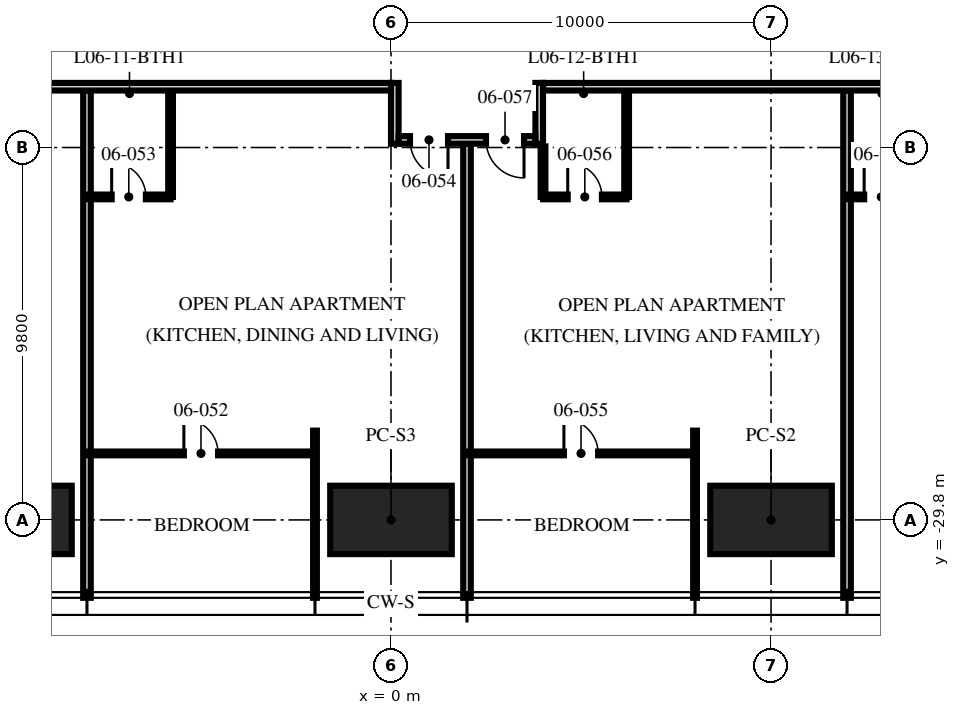
"""IFC4 building model, lengths in metres.
Left out: names, types, materials, properties, quantities, classifications, styles, units other than length and angle.
Written with IfcOpenShell. Run it as: python <this file> out.ifc"""

import sys

from ifc_helpers import new_model, si_unit, direction, frame, frame_2d, origin, origin_2d, place, context, subcontext, project, spatial, rectangle, hollow_rectangle, extrude, element, fill, save


model = new_model("IFC4")
c1 = context("Model", 3, precision=1e-05, world=origin(), true_north=direction((0.0, 1.0)))
c2 = subcontext(c1, "Body", "Model", "MODEL_VIEW")
j1 = project(units=[si_unit("LENGTHUNIT", "METRE"), si_unit("PLANEANGLEUNIT", "RADIAN")], contexts=[c1])
p1 = place(None, origin())
s1 = spatial("IfcSite", under=j1, at=p1, CompositionType="ELEMENT")
p2 = place(p1, origin())
s2 = spatial("IfcBuilding", under=s1, at=p2, CompositionType="ELEMENT")
p3 = place(p2, frame((0.0, 0.0, 28.5)))
s3 = spatial("IfcBuildingStorey", under=s2, at=p3, CompositionType="ELEMENT", Elevation=28.5)
for number, where, z_axis, x_axis in (
    (1, (10.0, -29.8, 0.0), (0.0, 0.0, 1.0), (1.0, 0.0, 0.0)),
    (2, (0.0, -29.8, 0.0), (0.0, 0.0, 1.0), (1.0, 0.0, 0.0)),
    (3, (-10.0, -29.8, 0.0), (0.0, 0.0, 1.0), (1.0, 0.0, 0.0)),
):
    element("IfcColumn", number, at=place(p3, frame(where, z_axis=z_axis, x_axis=x_axis)), inside=s3, PredefinedType="COLUMN", context=c2, shape_type="SweptSolid", body=[
        extrude(hollow_rectangle(XDim=3.2, YDim=1.8, WallThickness=0.2, at=origin_2d()), origin(), (0.0, 0.0, 1.0), 3.75),
    ])
p4 = place(p3, frame((-8.0, -18.5, 0.0), z_axis=(0.0, 0.0, 1.0), x_axis=(0.0, -1.0, 0.0)))
e4 = element("IfcWall", 4, at=p4, inside=s3, PredefinedType="PARTITIONING", context=c2, shape_type="SweptSolid", body=[
    extrude(rectangle(XDim=13.35, YDim=0.2, at=frame_2d((6.675, 0.0))), origin(), (0.0, 0.0, 1.0), 2.71),
])
p5 = place(p3, frame((-2.0, -27.45, 0.0), z_axis=(0.0, 0.0, 1.0), x_axis=(0.0, -1.0, 0.0)))
e5 = element("IfcWall", 5, at=p5, inside=s3, PredefinedType="PARTITIONING", context=c2, shape_type="SweptSolid", body=[
    extrude(rectangle(XDim=4.4, YDim=0.1, at=frame_2d((2.2, 0.0))), origin(), (0.0, 0.0, 1.0), 2.71),
])
p6 = place(p3, frame((2.0, -19.9, 0.0), z_axis=(0.0, 0.0, 1.0), x_axis=(0.0, -1.0, 0.0)))
e6 = element("IfcWall", 6, at=p6, inside=s3, PredefinedType="PARTITIONING", context=c2, shape_type="SweptSolid", body=[
    extrude(rectangle(XDim=11.95, YDim=0.2, at=frame_2d((5.975, 0.0))), origin(), (0.0, 0.0, 1.0), 2.71),
])
p7 = place(p3, frame((8.0, -27.45, 0.0), z_axis=(0.0, 0.0, 1.0), x_axis=(0.0, -1.0, 0.0)))
e7 = element("IfcWall", 7, at=p7, inside=s3, PredefinedType="PARTITIONING", context=c2, shape_type="SweptSolid", body=[
    extrude(rectangle(XDim=4.4, YDim=0.1, at=frame_2d((2.2, 0.0))), origin(), (0.0, 0.0, 1.0), 2.71),
])
p8 = place(p3, frame((12.0, -18.5, 0.0), z_axis=(0.0, 0.0, 1.0), x_axis=(0.0, -1.0, 0.0)))
e8 = element("IfcWall", 8, at=p8, inside=s3, PredefinedType="PARTITIONING", context=c2, shape_type="SweptSolid", body=[
    extrude(rectangle(XDim=13.35, YDim=0.2, at=frame_2d((6.675, 0.0))), origin(), (0.0, 0.0, 1.0), 2.71),
])
p9 = place(p3, frame((-8.0, -28.05, 0.0), z_axis=(0.0, 0.0, 1.0), x_axis=(1.0, 0.0, 0.0)))
e9 = element("IfcWall", 9, at=p9, inside=s3, PredefinedType="PARTITIONING", context=c2, shape_type="SweptSolid", body=[
    extrude(rectangle(XDim=6.0, YDim=0.1, at=frame_2d((3.0, 0.0))), origin(), (0.0, 0.0, 1.0), 2.61),
])
p10 = place(p9, frame((2.55, 0.0, 0.0)))
e10 = element("IfcOpeningElement", 10, at=p10, cuts=e9, PredefinedType="OPENING", context=c2, shape_type="SweptSolid", body=[
    extrude(rectangle(XDim=0.9, YDim=2.1, at=frame_2d((0.45, 1.05))), frame((0.0, 0.06, 0.0), z_axis=(0.0, -1.0, 0.0), x_axis=(1.0, 0.0, 0.0)), (0.0, 0.0, 1.0), 0.12),
])
p11 = place(p3, frame((-8.0, -21.3, 0.0), z_axis=(0.0, 0.0, 1.0), x_axis=(1.0, 0.0, 0.0)))
e11 = element("IfcWall", 11, at=p11, inside=s3, PredefinedType="PARTITIONING", context=c2, shape_type="SweptSolid", body=[
    extrude(rectangle(XDim=2.2, YDim=0.125, at=frame_2d((1.1, 0.0))), origin(), (0.0, 0.0, 1.0), 3.5),
])
p12 = place(p11, frame((0.65, 0.0, 0.0)))
e12 = element("IfcOpeningElement", 12, at=p12, cuts=e11, PredefinedType="OPENING", context=c2, shape_type="SweptSolid", body=[
    extrude(rectangle(XDim=0.9, YDim=2.1, at=frame_2d((0.45, 1.05))), frame((0.0, 0.073, 0.0), z_axis=(0.0, -1.0, 0.0), x_axis=(1.0, 0.0, 0.0)), (0.0, 0.0, 1.0), 0.145),
])
p13 = place(p3, frame((-5.8, -18.5, 0.0), z_axis=(0.0, 0.0, 1.0), x_axis=(0.0, -1.0, 0.0)))
e13 = element("IfcWall", 13, at=p13, inside=s3, PredefinedType="PARTITIONING", context=c2, shape_type="SweptSolid", body=[
    extrude(rectangle(XDim=2.8, YDim=0.125, at=frame_2d((1.4, 0.0))), origin(), (0.0, 0.0, 1.0), 3.5),
])
p14 = place(p3, frame((2.0, -28.05, 0.0), z_axis=(0.0, 0.0, 1.0), x_axis=(1.0, 0.0, 0.0)))
e14 = element("IfcWall", 14, at=p14, inside=s3, PredefinedType="PARTITIONING", context=c2, shape_type="SweptSolid", body=[
    extrude(rectangle(XDim=6.0, YDim=0.1, at=frame_2d((3.0, 0.0))), origin(), (0.0, 0.0, 1.0), 2.61),
])
p15 = place(p14, frame((2.55, 0.0, 0.0)))
e15 = element("IfcOpeningElement", 15, at=p15, cuts=e14, PredefinedType="OPENING", context=c2, shape_type="SweptSolid", body=[
    extrude(rectangle(XDim=0.9, YDim=2.1, at=frame_2d((0.45, 1.05))), frame((0.0, 0.06, 0.0), z_axis=(0.0, -1.0, 0.0), x_axis=(1.0, 0.0, 0.0)), (0.0, 0.0, 1.0), 0.12),
])
p16 = place(p3, frame((4.0, -21.3, 0.0), z_axis=(0.0, 0.0, 1.0), x_axis=(1.0, 0.0, 0.0)))
e16 = element("IfcWall", 16, at=p16, inside=s3, PredefinedType="PARTITIONING", context=c2, shape_type="SweptSolid", body=[
    extrude(rectangle(XDim=2.2, YDim=0.125, at=frame_2d((1.1, 0.0))), origin(), (0.0, 0.0, 1.0), 2.61),
])
p17 = place(p16, frame((0.65, 0.0, 0.0)))
e17 = element("IfcOpeningElement", 17, at=p17, cuts=e16, PredefinedType="OPENING", context=c2, shape_type="SweptSolid", body=[
    extrude(rectangle(XDim=0.9, YDim=2.1, at=frame_2d((0.45, 1.05))), frame((0.0, 0.073, 0.0), z_axis=(0.0, -1.0, 0.0), x_axis=(1.0, 0.0, 0.0)), (0.0, 0.0, 1.0), 0.145),
])
p18 = place(p3, frame((4.0, -19.97, 0.0), z_axis=(0.0, 0.0, 1.0), x_axis=(0.0, -1.0, 0.0)))
e18 = element("IfcWall", 18, at=p18, inside=s3, PredefinedType="PARTITIONING", context=c2, shape_type="SweptSolid", body=[
    extrude(rectangle(XDim=1.33, YDim=0.125, at=frame_2d((0.665, 0.0))), origin(), (0.0, 0.0, 1.0), 3.5),
])
p19 = place(p3, frame((6.2, -18.5, 0.0), z_axis=(0.0, 0.0, 1.0), x_axis=(0.0, -1.0, 0.0)))
e19 = element("IfcWall", 19, at=p19, inside=s3, PredefinedType="PARTITIONING", context=c2, shape_type="SweptSolid", body=[
    extrude(rectangle(XDim=2.8, YDim=0.125, at=frame_2d((1.4, 0.0))), origin(), (0.0, 0.0, 1.0), 3.5),
])
p20 = place(p3, frame((12.0, -21.3, 0.0), z_axis=(0.0, 0.0, 1.0), x_axis=(1.0, 0.0, 0.0)))
e20 = element("IfcWall", 20, at=p20, inside=s3, PredefinedType="PARTITIONING", context=c2, shape_type="SweptSolid", body=[
    extrude(rectangle(XDim=1.8, YDim=0.125, at=frame_2d((0.9, 0.0))), origin(), (0.0, 0.0, 1.0), 3.5),
])
p21 = place(p20, frame((0.45, 0.0, 0.0)))
e21 = element("IfcOpeningElement", 21, at=p21, cuts=e20, PredefinedType="OPENING", context=c2, shape_type="SweptSolid", body=[
    extrude(rectangle(XDim=0.9, YDim=2.1, at=frame_2d((0.45, 1.05))), frame((0.0, 0.073, 0.0), z_axis=(0.0, -1.0, 0.0), x_axis=(1.0, 0.0, 0.0)), (0.0, 0.0, 1.0), 0.145),
])
p22 = place(p3, frame((18.5, -18.4, 0.0), z_axis=(0.0, 0.0, 1.0), x_axis=(-1.0, 0.0, 0.0)))
e22 = element("IfcWall", 22, at=p22, inside=s3, PredefinedType="PARTITIONING", context=c2, shape_type="SweptSolid", body=[
    extrude(rectangle(XDim=14.5, YDim=0.2, at=frame_2d((7.25, 0.0))), origin(), (0.0, 0.0, 1.0), 2.3),
])
p23 = place(p22, frame((0.93, 0.0, 0.0)))
e23 = element("IfcOpeningElement", 23, at=p23, cuts=e22, PredefinedType="OPENING", context=c2, shape_type="SweptSolid", body=[
    extrude(rectangle(XDim=1.0, YDim=2.2, at=frame_2d((0.5, 1.1))), frame((0.0, 0.11, 0.0), z_axis=(0.0, -1.0, 0.0), x_axis=(1.0, 0.0, 0.0)), (0.0, 0.0, 1.0), 0.22),
])
p24 = place(p3, frame((3.9, -18.3, 0.0), z_axis=(0.0, 0.0, 1.0), x_axis=(0.0, -1.0, 0.0)))
e24 = element("IfcWall", 24, at=p24, inside=s3, PredefinedType="PARTITIONING", context=c2, shape_type="SweptSolid", body=[
    extrude(rectangle(XDim=1.6, YDim=0.2, at=frame_2d((0.8, 0.0))), origin(), (0.0, 0.0, 1.0), 3.5),
])
p25 = place(p3, frame((0.1, -18.3, 0.0), z_axis=(0.0, 0.0, 1.0), x_axis=(0.0, -1.0, 0.0)))
e25 = element("IfcWall", 25, at=p25, inside=s3, PredefinedType="PARTITIONING", context=c2, shape_type="SweptSolid", body=[
    extrude(rectangle(XDim=1.6, YDim=0.2, at=frame_2d((0.8, 0.0))), origin(), (0.0, 0.0, 1.0), 2.492),
])
p26 = place(p3, frame((3.8, -19.8, 0.0), z_axis=(0.0, 0.0, 1.0), x_axis=(-1.0, 0.0, 0.0)))
e26 = element("IfcWall", 26, at=p26, inside=s3, PredefinedType="PARTITIONING", context=c2, shape_type="SweptSolid", body=[
    extrude(rectangle(XDim=3.6, YDim=0.2, at=frame_2d((1.8, 0.0))), origin(), (0.0, 0.0, 1.0), 3.5),
])
p27 = place(p26, frame((2.3, 0.0, 0.0)))
e27 = element("IfcOpeningElement", 27, at=p27, cuts=e26, PredefinedType="OPENING", context=c2, shape_type="SweptSolid", body=[
    extrude(rectangle(XDim=1.0, YDim=2.2, at=frame_2d((0.5, 1.1))), frame((0.0, 0.11, 0.0), z_axis=(0.0, -1.0, 0.0), x_axis=(1.0, 0.0, 0.0)), (0.0, 0.0, 1.0), 0.22),
])
p28 = place(p26, frame((0.3, 0.0, 0.0)))
e28 = element("IfcOpeningElement", 28, at=p28, cuts=e26, PredefinedType="OPENING", context=c2, shape_type="SweptSolid", body=[
    extrude(rectangle(XDim=1.0, YDim=2.2, at=frame_2d((0.5, 1.1))), frame((0.0, 0.11, 0.0), z_axis=(0.0, -1.0, 0.0), x_axis=(1.0, 0.0, 0.0)), (0.0, 0.0, 1.0), 0.22),
])
p29 = place(p3, frame((0.0, -18.4, 0.0), z_axis=(0.0, 0.0, 1.0), x_axis=(-1.0, 0.0, 0.0)))
e29 = element("IfcWall", 29, at=p29, inside=s3, PredefinedType="PARTITIONING", context=c2, shape_type="SweptSolid", body=[
    extrude(rectangle(XDim=18.5, YDim=0.2, at=frame_2d((9.25, 0.0))), origin(), (0.0, 0.0, 1.0), 2.3),
])
p30 = place(p10, origin())
e30 = element("IfcDoor", 30, at=p30, inside=s3, OperationType="SINGLE_SWING_LEFT", PredefinedType="DOOR", context=c2, shape_type="SweptSolid", body=[
    extrude(rectangle(XDim=0.9, YDim=2.1, at=frame_2d((0.45, 1.05))), frame((0.0, 0.025, 0.0), z_axis=(0.0, -1.0, 0.0), x_axis=(1.0, 0.0, 0.0)), (0.0, 0.0, 1.0), 0.05),
])
fill(e10, e30)
p31 = place(p12, origin())
e31 = element("IfcDoor", 31, at=p31, inside=s3, OperationType="SINGLE_SWING_LEFT", PredefinedType="DOOR", context=c2, shape_type="SweptSolid", body=[
    extrude(rectangle(XDim=0.9, YDim=2.1, at=frame_2d((0.45, 1.05))), frame((0.0, 0.025, 0.0), z_axis=(0.0, -1.0, 0.0), x_axis=(1.0, 0.0, 0.0)), (0.0, 0.0, 1.0), 0.05),
])
fill(e12, e31)
p32 = place(p27, origin())
e32 = element("IfcDoor", 32, at=p32, inside=s3, OperationType="SINGLE_SWING_LEFT", PredefinedType="DOOR", context=c2, shape_type="SweptSolid", body=[
    extrude(rectangle(XDim=1.0, YDim=2.2, at=frame_2d((0.5, 1.1))), frame((0.0, 0.025, 0.0), z_axis=(0.0, -1.0, 0.0), x_axis=(1.0, 0.0, 0.0)), (0.0, 0.0, 1.0), 0.05),
])
fill(e27, e32)
p33 = place(p15, origin())
e33 = element("IfcDoor", 33, at=p33, inside=s3, OperationType="SINGLE_SWING_LEFT", PredefinedType="DOOR", context=c2, shape_type="SweptSolid", body=[
    extrude(rectangle(XDim=0.9, YDim=2.1, at=frame_2d((0.45, 1.05))), frame((0.0, 0.025, 0.0), z_axis=(0.0, -1.0, 0.0), x_axis=(1.0, 0.0, 0.0)), (0.0, 0.0, 1.0), 0.05),
])
fill(e15, e33)
p34 = place(p17, origin())
e34 = element("IfcDoor", 34, at=p34, inside=s3, OperationType="SINGLE_SWING_LEFT", PredefinedType="DOOR", context=c2, shape_type="SweptSolid", body=[
    extrude(rectangle(XDim=0.9, YDim=2.1, at=frame_2d((0.45, 1.05))), frame((0.0, 0.025, 0.0), z_axis=(0.0, -1.0, 0.0), x_axis=(1.0, 0.0, 0.0)), (0.0, 0.0, 1.0), 0.05),
])
fill(e17, e34)
p35 = place(p28, origin())
e35 = element("IfcDoor", 35, at=p35, inside=s3, OperationType="SINGLE_SWING_LEFT", PredefinedType="DOOR", context=c2, shape_type="SweptSolid", body=[
    extrude(rectangle(XDim=1.0, YDim=2.2, at=frame_2d((0.5, 1.1))), frame((0.0, 0.025, 0.0), z_axis=(0.0, -1.0, 0.0), x_axis=(1.0, 0.0, 0.0)), (0.0, 0.0, 1.0), 0.05),
])
fill(e28, e35)
p36 = place(p21, origin())
e36 = element("IfcDoor", 36, at=p36, inside=s3, OperationType="SINGLE_SWING_LEFT", PredefinedType="DOOR", context=c2, shape_type="SweptSolid", body=[
    extrude(rectangle(XDim=0.9, YDim=2.1, at=frame_2d((0.45, 1.05))), frame((0.0, 0.025, 0.0), z_axis=(0.0, -1.0, 0.0), x_axis=(1.0, 0.0, 0.0)), (0.0, 0.0, 1.0), 0.05),
])
fill(e21, e36)
save(model, sys.argv[1])
